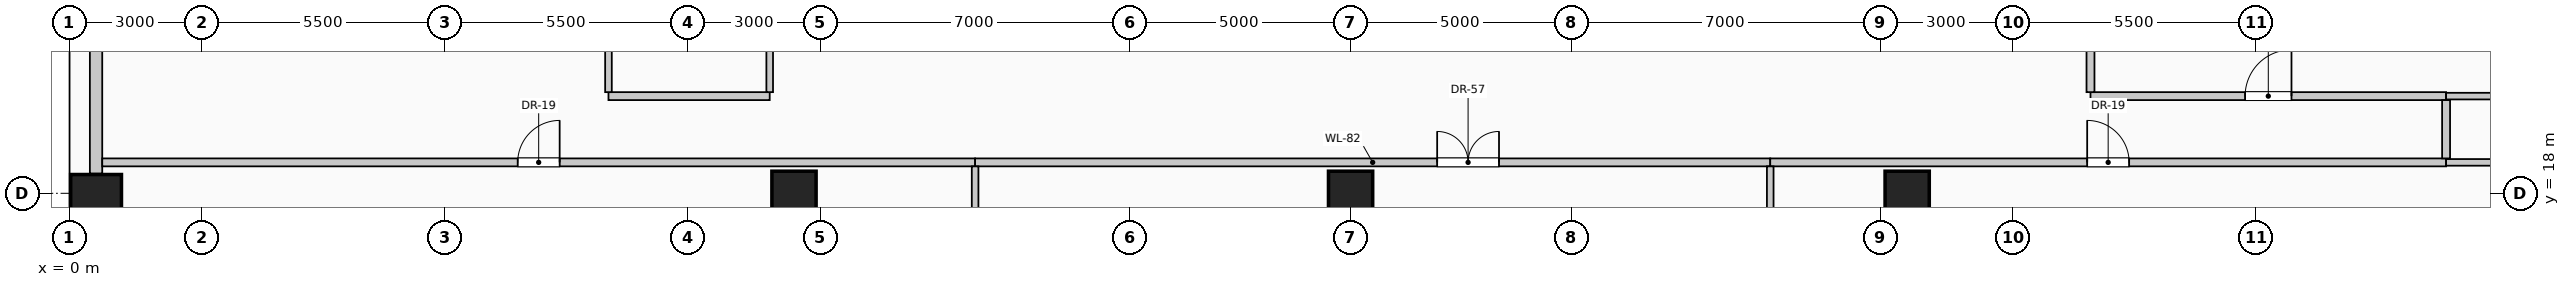
"""IFC4 building model, lengths in metres.
Left out: names, types, materials, properties, quantities, classifications, styles, units other than length and angle.
Written with IfcOpenShell. Run it as: python <this file> out.ifc"""

import sys

from ifc_helpers import new_model, si_unit, direction, frame, frame_2d, origin, origin_2d, place, context, subcontext, project, spatial, rectangle, circle, extrude, element, fill, save


model = new_model("IFC4")
c1 = context("Model", 3, precision=1e-05, world=origin(), true_north=direction((0.0, 1.0)))
c2 = subcontext(c1, "Body", "Model", "MODEL_VIEW")
j1 = project(units=[si_unit("LENGTHUNIT", "METRE"), si_unit("PLANEANGLEUNIT", "RADIAN")], contexts=[c1])
p1 = place(None, origin())
s1 = spatial("IfcSite", under=j1, at=p1, CompositionType="ELEMENT")
p2 = place(p1, origin())
s2 = spatial("IfcBuilding", under=s1, at=p2, CompositionType="ELEMENT")
p3 = place(p2, frame((0.0, 0.0, 87.8)))
s3 = spatial("IfcBuildingStorey", under=s2, at=p3, CompositionType="ELEMENT", Elevation=87.8)
p4 = place(p3, frame((0.6, 18.0, 0.0), z_axis=(0.0, 0.0, 1.0), x_axis=(0.0, 1.0, 0.0)))
e1 = element("IfcColumn", 1, at=p4, inside=s3, PredefinedType="COLUMN", context=c2, shape_type="SweptSolid", body=[
    extrude(rectangle(XDim=0.85, YDim=1.15, at=origin_2d()), origin(), (0.0, 0.0, 1.0), 4.8),
])
for number, where, z_axis, x_axis in (
    (2, (16.4, 18.0, 0.0), (0.0, 0.0, 1.0), (1.0, 0.0, 0.0)),
    (3, (29.0, 18.0, 0.0), (0.0, 0.0, 1.0), (1.0, 0.0, 0.0)),
    (4, (41.6, 18.0, 0.0), (0.0, 0.0, 1.0), (1.0, 0.0, 0.0)),
):
    element("IfcColumn", number, at=place(p3, frame(where, z_axis=z_axis, x_axis=x_axis)), inside=s3, PredefinedType="COLUMN", context=c2, shape_type="SweptSolid", body=[
        extrude(circle(Radius=0.5, at=origin_2d()), origin(), (0.0, 0.0, 1.0), 4.8),
    ])
p5 = place(p3, frame((0.6, 18.445, 0.0), z_axis=(0.0, 0.0, 1.0), x_axis=(0.0, 1.0, 0.0)))
e5 = element("IfcWall", 5, at=p5, inside=s3, PredefinedType="SOLIDWALL", context=c2, shape_type="SweptSolid", body=[
    extrude(rectangle(XDim=7.11, YDim=0.28, at=frame_2d((3.555, 0.0))), origin(), (0.0, 0.0, 1.0), 3.675),
])
p6 = place(p3, frame((0.74, 18.7, 0.0), z_axis=(0.0, 0.0, 1.0), x_axis=(1.0, 0.0, 0.0)))
e6 = element("IfcWall", 6, at=p6, inside=s3, PredefinedType="PARTITIONING", context=c2, shape_type="SweptSolid", body=[
    extrude(rectangle(XDim=19.76, YDim=0.18, at=frame_2d((9.88, 0.0))), origin(), (0.0, 0.0, 1.0), 4.525),
])
p7 = place(p6, frame((9.405, 0.0, 0.0)))
e7 = element("IfcOpeningElement", 7, at=p7, cuts=e6, PredefinedType="OPENING", context=c2, shape_type="SweptSolid", body=[
    extrude(rectangle(XDim=0.95, YDim=2.15, at=frame_2d((0.475, 1.075))), frame((0.0, 0.1, 0.0), z_axis=(0.0, -1.0, 0.0), x_axis=(1.0, 0.0, 0.0)), (0.0, 0.0, 1.0), 0.2),
])
p8 = place(p3, frame((20.5, 18.7, 0.0), z_axis=(0.0, 0.0, 1.0), x_axis=(1.0, 0.0, 0.0)))
e8 = element("IfcWall", 8, at=p8, inside=s3, PredefinedType="PARTITIONING", context=c2, shape_type="SweptSolid", body=[
    extrude(rectangle(XDim=18.0, YDim=0.18, at=frame_2d((9.0, 0.0))), origin(), (0.0, 0.0, 1.0), 4.525),
])
p9 = place(p8, frame((10.46, 0.0, 0.0)))
e9 = element("IfcOpeningElement", 9, at=p9, cuts=e8, PredefinedType="OPENING", context=c2, shape_type="SweptSolid", body=[
    extrude(rectangle(XDim=1.4, YDim=2.2, at=frame_2d((0.7, 1.1))), frame((0.0, 0.1, 0.0), z_axis=(0.0, -1.0, 0.0), x_axis=(1.0, 0.0, 0.0)), (0.0, 0.0, 1.0), 0.2),
])
p10 = place(p3, frame((38.5, 18.7, 0.0), z_axis=(0.0, 0.0, 1.0), x_axis=(1.0, 0.0, 0.0)))
e10 = element("IfcWall", 10, at=p10, inside=s3, PredefinedType="PARTITIONING", context=c2, shape_type="SweptSolid", body=[
    extrude(rectangle(XDim=15.3, YDim=0.18, at=frame_2d((7.65, 0.0))), origin(), (0.0, 0.0, 1.0), 4.525),
])
p11 = place(p10, frame((7.175, 0.0, 0.0)))
e11 = element("IfcOpeningElement", 11, at=p11, cuts=e10, PredefinedType="OPENING", context=c2, shape_type="SweptSolid", body=[
    extrude(rectangle(XDim=0.95, YDim=2.15, at=frame_2d((0.475, 1.075))), frame((0.0, 0.1, 0.0), z_axis=(0.0, -1.0, 0.0), x_axis=(1.0, 0.0, 0.0)), (0.0, 0.0, 1.0), 0.2),
])
p12 = place(p3, frame((53.8, 18.7, 0.0), z_axis=(0.0, 0.0, 1.0), x_axis=(1.0, 0.0, 0.0)))
e12 = element("IfcWall", 12, at=p12, inside=s3, PredefinedType="PARTITIONING", context=c2, shape_type="SweptSolid", body=[
    extrude(rectangle(XDim=3.46, YDim=0.15, at=frame_2d((1.73, 0.0))), origin(), (0.0, 0.0, 1.0), 4.525),
])
p13 = place(p3, frame((12.2, 20.2, 0.0), z_axis=(0.0, 0.0, 1.0), x_axis=(1.0, 0.0, 0.0)))
e13 = element("IfcWall", 13, at=p13, inside=s3, PredefinedType="PARTITIONING", context=c2, shape_type="SweptSolid", body=[
    extrude(rectangle(XDim=3.65, YDim=0.18, at=frame_2d((1.825, 0.0))), origin(), (0.0, 0.0, 1.0), 4.525),
])
p14 = place(p3, frame((45.75, 20.2, 0.0), z_axis=(0.0, 0.0, 1.0), x_axis=(1.0, 0.0, 0.0)))
e14 = element("IfcWall", 14, at=p14, inside=s3, PredefinedType="PARTITIONING", context=c2, shape_type="SweptSolid", body=[
    extrude(rectangle(XDim=8.05, YDim=0.18, at=frame_2d((4.025, 0.0))), origin(), (0.0, 0.0, 1.0), 4.525),
])
p15 = place(p14, frame((3.5, 0.0, 0.0)))
e15 = element("IfcOpeningElement", 15, at=p15, cuts=e14, PredefinedType="OPENING", context=c2, shape_type="SweptSolid", body=[
    extrude(rectangle(XDim=1.05, YDim=2.15, at=frame_2d((0.525, 1.075))), frame((0.0, 0.1, 0.0), z_axis=(0.0, -1.0, 0.0), x_axis=(1.0, 0.0, 0.0)), (0.0, 0.0, 1.0), 0.2),
])
p16 = place(p3, frame((53.8, 20.2, 0.0), z_axis=(0.0, 0.0, 1.0), x_axis=(1.0, 0.0, 0.0)))
e16 = element("IfcWall", 16, at=p16, inside=s3, PredefinedType="PARTITIONING", context=c2, shape_type="SweptSolid", body=[
    extrude(rectangle(XDim=3.46, YDim=0.15, at=frame_2d((1.73, 0.0))), origin(), (0.0, 0.0, 1.0), 4.525),
])
p17 = place(p3, frame((12.2, 20.29, 0.0), z_axis=(0.0, 0.0, 1.0), x_axis=(0.0, 1.0, 0.0)))
e17 = element("IfcWall", 17, at=p17, inside=s3, PredefinedType="PARTITIONING", context=c2, shape_type="SweptSolid", body=[
    extrude(rectangle(XDim=1.81, YDim=0.15, at=frame_2d((0.905, 0.0))), origin(), (0.0, 0.0, 1.0), 4.525),
])
p18 = place(p3, frame((15.85, 20.29, 0.0), z_axis=(0.0, 0.0, 1.0), x_axis=(0.0, 1.0, 0.0)))
e18 = element("IfcWall", 18, at=p18, inside=s3, PredefinedType="PARTITIONING", context=c2, shape_type="SweptSolid", body=[
    extrude(rectangle(XDim=4.51, YDim=0.15, at=frame_2d((2.255, 0.0))), origin(), (0.0, 0.0, 1.0), 4.525),
])
p19 = place(p3, frame((20.5, 0.6, 0.0), z_axis=(0.0, 0.0, 1.0), x_axis=(0.0, 1.0, 0.0)))
e19 = element("IfcWall", 19, at=p19, inside=s3, PredefinedType="PARTITIONING", context=c2, shape_type="SweptSolid", body=[
    extrude(rectangle(XDim=18.01, YDim=0.15, at=frame_2d((9.005, 0.0))), origin(), (0.0, 0.0, 1.0), 4.525),
])
p20 = place(p3, frame((38.5, 0.74, 0.0), z_axis=(0.0, 0.0, 1.0), x_axis=(0.0, 1.0, 0.0)))
e20 = element("IfcWall", 20, at=p20, inside=s3, PredefinedType="PARTITIONING", context=c2, shape_type="SweptSolid", body=[
    extrude(rectangle(XDim=17.87, YDim=0.15, at=frame_2d((8.935, 0.0))), origin(), (0.0, 0.0, 1.0), 4.525),
])
p21 = place(p3, frame((45.75, 20.29, 0.0), z_axis=(0.0, 0.0, 1.0), x_axis=(0.0, 1.0, 0.0)))
e21 = element("IfcWall", 21, at=p21, inside=s3, PredefinedType="PARTITIONING", context=c2, shape_type="SweptSolid", body=[
    extrude(rectangle(XDim=11.985, YDim=0.18, at=frame_2d((5.992, 0.0))), origin(), (0.0, 0.0, 1.0), 4.525),
])
p22 = place(p3, frame((53.8, 18.79, 0.0), z_axis=(0.0, 0.0, 1.0), x_axis=(0.0, 1.0, 0.0)))
e22 = element("IfcWall", 22, at=p22, inside=s3, PredefinedType="PARTITIONING", context=c2, shape_type="SweptSolid", body=[
    extrude(rectangle(XDim=1.32, YDim=0.18, at=frame_2d((0.66, 0.0))), origin(), (0.0, 0.0, 1.0), 4.525),
])
p23 = place(p7, origin())
e23 = element("IfcDoor", 23, at=p23, inside=s3, OperationType="SINGLE_SWING_RIGHT", PredefinedType="DOOR", context=c2, shape_type="SweptSolid", body=[
    extrude(rectangle(XDim=0.95, YDim=2.15, at=frame_2d((0.475, 1.075))), frame((0.0, 0.025, 0.0), z_axis=(0.0, -1.0, 0.0), x_axis=(1.0, 0.0, 0.0)), (0.0, 0.0, 1.0), 0.05),
])
fill(e7, e23)
p24 = place(p9, origin())
e24 = element("IfcDoor", 24, at=p24, inside=s3, OperationType="DOUBLE_DOOR_SINGLE_SWING", PredefinedType="DOOR", context=c2, shape_type="SweptSolid", body=[
    extrude(rectangle(XDim=1.4, YDim=2.2, at=frame_2d((0.7, 1.1))), frame((0.0, 0.025, 0.0), z_axis=(0.0, -1.0, 0.0), x_axis=(1.0, 0.0, 0.0)), (0.0, 0.0, 1.0), 0.05),
])
fill(e9, e24)
p25 = place(p11, origin())
e25 = element("IfcDoor", 25, at=p25, inside=s3, OperationType="SINGLE_SWING_LEFT", PredefinedType="DOOR", context=c2, shape_type="SweptSolid", body=[
    extrude(rectangle(XDim=0.95, YDim=2.15, at=frame_2d((0.475, 1.075))), frame((0.0, 0.025, 0.0), z_axis=(0.0, -1.0, 0.0), x_axis=(1.0, 0.0, 0.0)), (0.0, 0.0, 1.0), 0.05),
])
fill(e11, e25)
p26 = place(p15, origin())
e26 = element("IfcDoor", 26, at=p26, inside=s3, OperationType="SINGLE_SWING_RIGHT", PredefinedType="DOOR", context=c2, shape_type="SweptSolid", body=[
    extrude(rectangle(XDim=1.05, YDim=2.15, at=frame_2d((0.525, 1.075))), frame((0.0, 0.025, 0.0), z_axis=(0.0, -1.0, 0.0), x_axis=(1.0, 0.0, 0.0)), (0.0, 0.0, 1.0), 0.05),
])
fill(e15, e26)
save(model, sys.argv[1])
